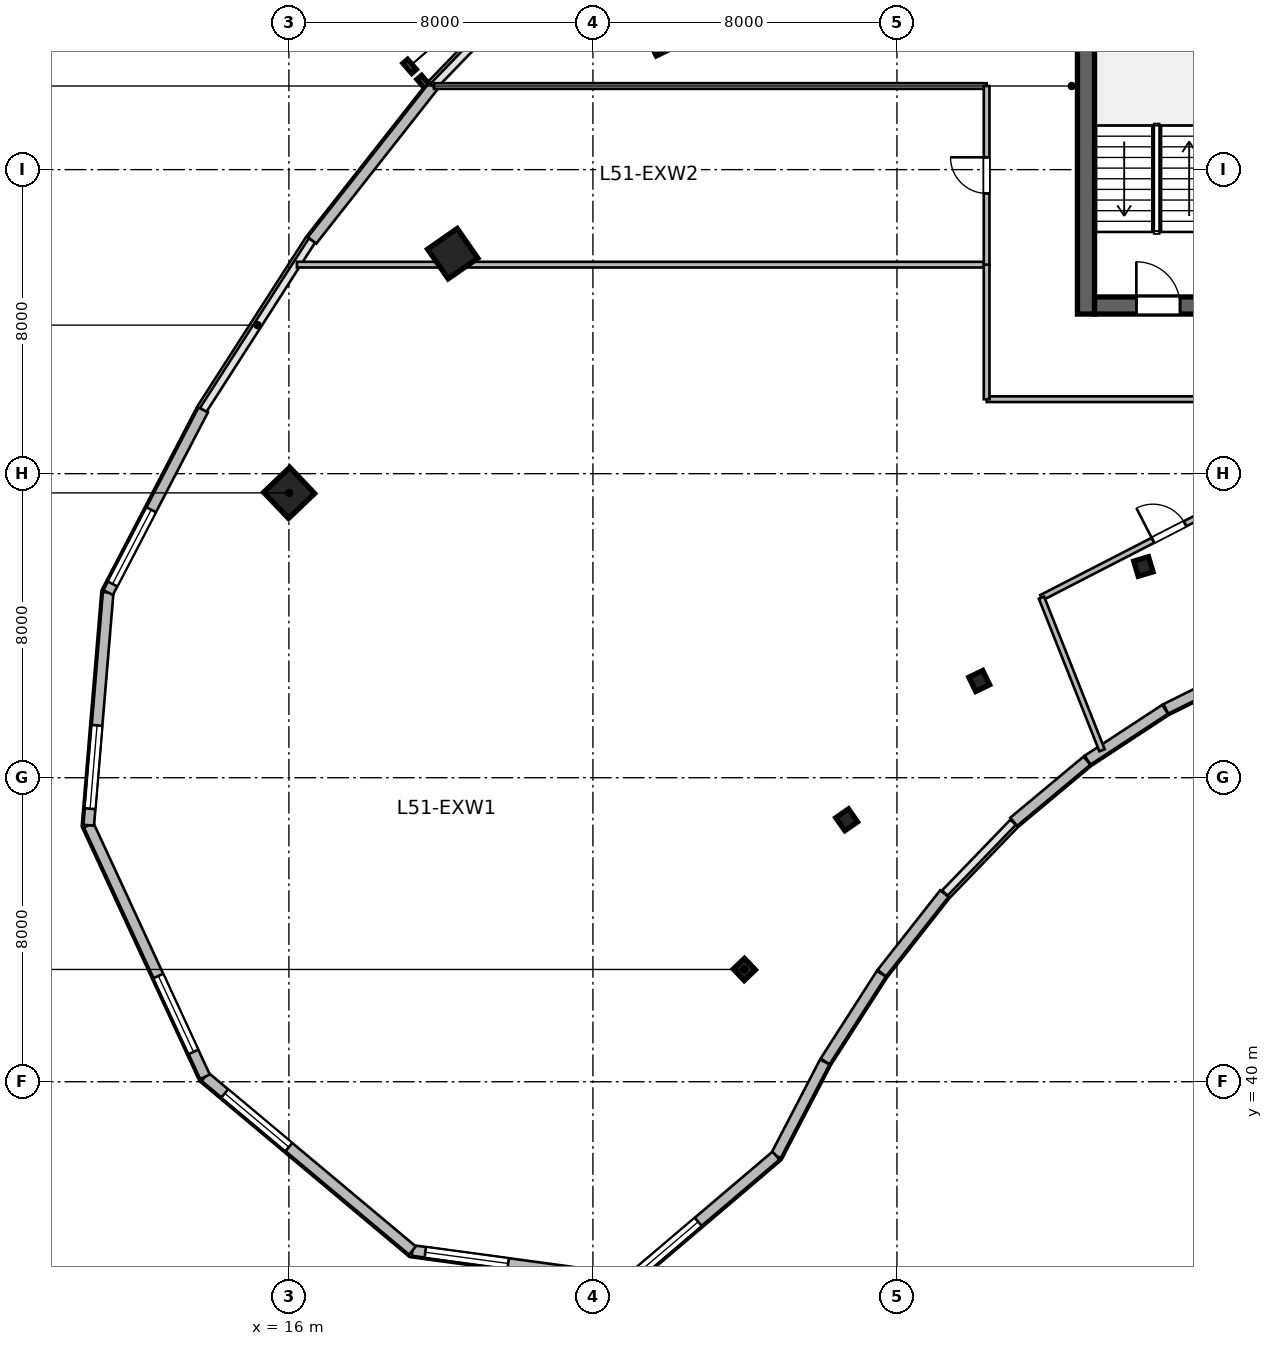
"""IFC4 building model, lengths in metres.
Left out: names, types, materials, properties, quantities, classifications, styles, units other than length and angle.
Written with IfcOpenShell. Run it as: python <this file> out.ifc"""

import sys

from ifc_helpers import new_model, si_unit, direction, frame, frame_2d, origin, origin_2d, place, context, subcontext, project, spatial, rectangle, i_section, extrude, source, transform, mapped, element, fill, save


model = new_model("IFC4")
c1 = context("Model", 3, precision=1e-05, world=origin(), true_north=direction((0.0, 1.0)))
c2 = subcontext(c1, "Body", "Model", "MODEL_VIEW")
j1 = project(units=[si_unit("LENGTHUNIT", "METRE"), si_unit("PLANEANGLEUNIT", "RADIAN")], contexts=[c1])
p1 = place(None, origin())
s1 = spatial("IfcSite", under=j1, at=p1, CompositionType="ELEMENT")
p2 = place(p1, origin())
s2 = spatial("IfcBuilding", under=s1, at=p2, CompositionType="ELEMENT")
p3 = place(p2, frame((0.0, 0.0, 211.8)))
s3 = spatial("IfcBuildingStorey", under=s2, at=p3, CompositionType="ELEMENT", Elevation=211.8)
m1 = source(origin(), c2, "Body", "SweptSolid", [
    extrude(rectangle(XDim=12.0, YDim=0.45, at=frame_2d((6.0, 0.0))), origin(), (0.0, 0.0, 1.0), 3.9),
])
p4 = place(p3, frame((36.975, 60.2, 0.0), z_axis=(0.0, 0.0, 1.0), x_axis=(0.0, 1.0, 0.0)))
e1 = element("IfcWall", 1, at=p4, inside=s3, PredefinedType="SHEAR", context=c2, shape_type="MappedRepresentation", body=[
    mapped(m1, transform((0.0, 0.0, 0.0), scale=1.0)),
])
m2 = source(origin(), c2, "Body", "SweptSolid", [
    extrude(rectangle(XDim=21.6, YDim=0.45, at=frame_2d((10.8, 0.0))), origin(), (0.0, 0.0, 1.0), 3.9),
])
p5 = place(p3, frame((37.2, 60.425, 0.0), z_axis=(0.0, 0.0, 1.0), x_axis=(1.0, 0.0, 0.0)))
e2 = element("IfcWall", 2, at=p5, inside=s3, PredefinedType="SHEAR", context=c2, shape_type="MappedRepresentation", body=[
    mapped(m2, transform((0.0, 0.0, 0.0), scale=1.0)),
])
p6 = place(p5, frame((1.1, 0.0, 0.0)))
e3 = element("IfcOpeningElement", 3, at=p6, cuts=e2, PredefinedType="OPENING", context=c2, shape_type="SweptSolid", body=[
    extrude(rectangle(XDim=1.15, YDim=2.15, at=frame_2d((0.575, 1.075))), frame((0.0, 0.235, 0.0), z_axis=(0.0, -1.0, 0.0), x_axis=(1.0, 0.0, 0.0)), (0.0, 0.0, 1.0), 0.47),
])
p7 = place(p5, frame((19.5, 0.0, 0.0)))
e4 = element("IfcOpeningElement", 4, at=p7, cuts=e2, PredefinedType="OPENING", context=c2, shape_type="SweptSolid", body=[
    extrude(rectangle(XDim=0.9, YDim=2.1, at=frame_2d((0.45, 1.05))), frame((0.0, 0.235, 0.0), z_axis=(0.0, -1.0, 0.0), x_axis=(1.0, 0.0, 0.0)), (0.0, 0.0, 1.0), 0.47),
])
p8 = place(p5, frame((12.02, 0.0, 0.0)))
e5 = element("IfcOpeningElement", 5, at=p8, cuts=e2, PredefinedType="OPENING", context=c2, shape_type="SweptSolid", body=[
    extrude(rectangle(XDim=1.6, YDim=2.15, at=frame_2d((0.8, 1.075))), frame((0.0, 0.235, 0.0), z_axis=(0.0, -1.0, 0.0), x_axis=(1.0, 0.0, 0.0)), (0.0, 0.0, 1.0), 0.47),
])
m3 = source(origin(), c2, "Body", "SweptSolid", [
    extrude(i_section(OverallWidth=0.406, OverallDepth=0.416, WebThickness=0.03, FlangeThickness=0.048, at=origin_2d()), origin(), (0.0, 0.0, 1.0), 3.9),
])
p9 = place(p3, frame((27.985, 42.955, 0.0), z_axis=(0.0, 0.0, 1.0), x_axis=(-0.690756218984, 0.723087716626, 0.0)))
e6 = element("IfcColumn", 6, at=p9, inside=s3, PredefinedType="COLUMN", context=c2, shape_type="MappedRepresentation", body=[
    mapped(m3, transform((0.0, 0.0, 0.0), scale=1.0)),
])
m4 = source(origin(), c2, "Body", "SweptSolid", [
    extrude(rectangle(XDim=0.95, YDim=0.95, at=origin_2d()), origin(), (0.0, 0.0, 1.0), 3.9),
])
p10 = place(p3, frame((16.007, 55.494, 0.0), z_axis=(0.0, 0.0, 1.0), x_axis=(-0.690756218984, 0.723087716626, 0.0)))
e7 = element("IfcColumn", 7, at=p10, inside=s3, PredefinedType="COLUMN", context=c2, shape_type="MappedRepresentation", body=[
    mapped(m4, transform((0.0, 0.0, 0.0), scale=1.0)),
])
p11 = place(p3, frame((30.677, 46.892, 0.0), z_axis=(0.0, 0.0, 1.0), x_axis=(-0.571143442153, 0.820850271661, 0.0)))
e8 = element("IfcColumn", 8, at=p11, inside=s3, PredefinedType="COLUMN", context=c2, shape_type="MappedRepresentation", body=[
    mapped(m3, transform((0.0, 0.0, 0.0), scale=1.0)),
])
p12 = place(p3, frame((20.311, 61.789, 0.0), z_axis=(0.0, 0.0, 1.0), x_axis=(-0.571143442153, 0.820850271661, 0.0)))
e9 = element("IfcColumn", 9, at=p12, inside=s3, PredefinedType="COLUMN", context=c2, shape_type="MappedRepresentation", body=[
    mapped(m4, transform((0.0, 0.0, 0.0), scale=1.0)),
])
p13 = place(p3, frame((34.166, 50.545, 0.0), z_axis=(0.0, 0.0, 1.0), x_axis=(-0.436173672171, 0.899862504889, 0.0)))
e10 = element("IfcColumn", 10, at=p13, inside=s3, PredefinedType="COLUMN", context=c2, shape_type="MappedRepresentation", body=[
    mapped(m3, transform((0.0, 0.0, 0.0), scale=1.0)),
])
p14 = place(p3, frame((25.888, 67.627, 0.0), z_axis=(0.0, 0.0, 1.0), x_axis=(-0.436173672171, 0.899862504889, 0.0)))
e11 = element("IfcColumn", 11, at=p14, inside=s3, PredefinedType="COLUMN", context=c2, shape_type="MappedRepresentation", body=[
    mapped(m4, transform((0.0, 0.0, 0.0), scale=1.0)),
])
p15 = place(p3, frame((38.485, 53.558, 0.0), z_axis=(0.0, 0.0, 1.0), x_axis=(-0.288697611798, 0.957420330337, 0.0)))
e12 = element("IfcColumn", 12, at=p15, inside=s3, PredefinedType="COLUMN", context=c2, shape_type="MappedRepresentation", body=[
    mapped(m3, transform((0.0, 0.0, 0.0), scale=1.0)),
])
m5 = source(origin(), c2, "Body", "SweptSolid", [
    extrude(rectangle(XDim=2.378, YDim=0.28, at=frame_2d((1.189, 0.0))), origin(), (0.0, 0.0, 1.0), 3.64),
])
p16 = place(p3, frame((41.207, 50.868, 0.0), z_axis=(0.0, 0.0, 1.0), x_axis=(-0.895941616831, -0.444171835252, 0.0)))
e13 = element("IfcWall", 13, at=p16, inside=s3, PredefinedType="SOLIDWALL", context=c2, shape_type="MappedRepresentation", body=[
    mapped(m5, transform((0.0, 0.0, 0.0), scale=1.0)),
])
m6 = source(origin(), c2, "Body", "SweptSolid", [
    extrude(rectangle(XDim=2.44, YDim=0.28, at=frame_2d((1.22, 0.0))), origin(), (0.0, 0.0, 1.0), 3.64),
])
p17 = place(p3, frame((39.057, 49.801, 0.0), z_axis=(0.0, 0.0, 1.0), x_axis=(-0.83598480459, -0.548752591333, 0.0)))
e14 = element("IfcWall", 14, at=p17, inside=s3, PredefinedType="SOLIDWALL", context=c2, shape_type="MappedRepresentation", body=[
    mapped(m6, transform((0.0, 0.0, 0.0), scale=1.0)),
])
m7 = source(origin(), c2, "Body", "SweptSolid", [
    extrude(rectangle(XDim=2.511, YDim=0.28, at=frame_2d((1.256, 0.0))), origin(), (0.0, 0.0, 1.0), 3.64),
])
p18 = place(p3, frame((37.001, 48.449, 0.0), z_axis=(0.0, 0.0, 1.0), x_axis=(-0.767910416122, -0.640557251782, 0.0)))
e15 = element("IfcWall", 15, at=p18, inside=s3, PredefinedType="SOLIDWALL", context=c2, shape_type="MappedRepresentation", body=[
    mapped(m7, transform((0.0, 0.0, 0.0), scale=1.0)),
])
m8 = source(origin(), c2, "Body", "SweptSolid", [
    extrude(rectangle(XDim=2.666, YDim=0.28, at=frame_2d((1.333, 0.0))), origin(), (0.0, 0.0, 1.0), 3.64),
])
p19 = place(p3, frame((33.249, 44.952, 0.0), z_axis=(0.0, 0.0, 1.0), x_axis=(-0.618161284122, -0.786051287648, 0.0)))
e16 = element("IfcWall", 16, at=p19, inside=s3, PredefinedType="SOLIDWALL", context=c2, shape_type="MappedRepresentation", body=[
    mapped(m8, transform((0.0, 0.0, 0.0), scale=1.0)),
])
m9 = source(origin(), c2, "Body", "SweptSolid", [
    extrude(rectangle(XDim=2.742, YDim=0.28, at=frame_2d((1.371, 0.0))), origin(), (0.0, 0.0, 1.0), 3.64),
])
p20 = place(p3, frame((31.591, 42.843, 0.0), z_axis=(0.0, 0.0, 1.0), x_axis=(-0.540172468355, -0.841554338371, 0.0)))
e17 = element("IfcWall", 17, at=p20, inside=s3, PredefinedType="SOLIDWALL", context=c2, shape_type="MappedRepresentation", body=[
    mapped(m9, transform((0.0, 0.0, 0.0), scale=1.0)),
])
m10 = source(origin(), c2, "Body", "SweptSolid", [
    extrude(rectangle(XDim=2.779, YDim=0.28, at=frame_2d((1.39, 0.0))), origin(), (0.0, 0.0, 1.0), 3.64),
])
p21 = place(p3, frame((30.101, 40.521, 0.0), z_axis=(0.0, 0.0, 1.0), x_axis=(-0.461770308601, -0.886999538948, 0.0)))
e18 = element("IfcWall", 18, at=p21, inside=s3, PredefinedType="SOLIDWALL", context=c2, shape_type="MappedRepresentation", body=[
    mapped(m10, transform((0.0, 0.0, 0.0), scale=1.0)),
])
m11 = source(origin(), c2, "Body", "SweptSolid", [
    extrude(rectangle(XDim=5.051, YDim=0.28, at=frame_2d((2.525, 0.0))), origin(), (0.0, 0.0, 1.0), 3.64),
])
p22 = place(p3, frame((28.818, 38.056, 0.0), z_axis=(0.0, 0.0, 1.0), x_axis=(-0.761904731537, -0.647689107568, 0.0)))
e19 = element("IfcWall", 19, at=p22, inside=s3, PredefinedType="SOLIDWALL", context=c2, shape_type="MappedRepresentation", body=[
    mapped(m11, transform((0.0, 0.0, 0.0), scale=1.0)),
])
p23 = place(p22, frame((2.688, 0.0, 0.95)))
e20 = element("IfcOpeningElement", 20, at=p23, cuts=e19, PredefinedType="OPENING", context=c2, shape_type="SweptSolid", body=[
    extrude(rectangle(XDim=2.2, YDim=2.1, at=frame_2d((1.1, 1.05))), frame((0.0, 0.15, 0.0), z_axis=(0.0, -1.0, 0.0), x_axis=(1.0, 0.0, 0.0)), (0.0, 0.0, 1.0), 0.3),
])
m12 = source(origin(), c2, "Body", "SweptSolid", [
    extrude(rectangle(XDim=5.771, YDim=0.28, at=frame_2d((2.886, 0.0))), origin(), (0.0, 0.0, 1.0), 3.64),
])
p24 = place(p3, frame((24.969, 34.784, 0.0), z_axis=(0.0, 0.0, 1.0), x_axis=(-0.990933615537, 0.134352408237, 0.0)))
e21 = element("IfcWall", 21, at=p24, inside=s3, PredefinedType="SOLIDWALL", context=c2, shape_type="MappedRepresentation", body=[
    mapped(m12, transform((0.0, 0.0, 0.0), scale=1.0)),
])
p25 = place(p24, frame((3.229, 0.0, 0.95)))
e22 = element("IfcOpeningElement", 22, at=p25, cuts=e21, PredefinedType="OPENING", context=c2, shape_type="SweptSolid", body=[
    extrude(rectangle(XDim=2.2, YDim=2.1, at=frame_2d((1.1, 1.05))), frame((0.0, 0.15, 0.0), z_axis=(0.0, -1.0, 0.0), x_axis=(1.0, 0.0, 0.0)), (0.0, 0.0, 1.0), 0.3),
])
m13 = source(origin(), c2, "Body", "SweptSolid", [
    extrude(rectangle(XDim=7.12, YDim=0.28, at=frame_2d((3.56, 0.0))), origin(), (0.0, 0.0, 1.0), 3.64),
])
p26 = place(p3, frame((19.25, 35.56, 0.0), z_axis=(0.0, 0.0, 1.0), x_axis=(-0.766709783564, 0.641993853387, 0.0)))
e23 = element("IfcWall", 23, at=p26, inside=s3, PredefinedType="SOLIDWALL", context=c2, shape_type="MappedRepresentation", body=[
    mapped(m13, transform((0.0, 0.0, 0.0), scale=1.0)),
])
p27 = place(p26, frame((4.24, 0.0, 0.95)))
e24 = element("IfcOpeningElement", 24, at=p27, cuts=e23, PredefinedType="OPENING", context=c2, shape_type="SweptSolid", body=[
    extrude(rectangle(XDim=2.2, YDim=2.1, at=frame_2d((1.1, 1.05))), frame((0.0, 0.15, 0.0), z_axis=(0.0, -1.0, 0.0), x_axis=(1.0, 0.0, 0.0)), (0.0, 0.0, 1.0), 0.3),
])
m14 = source(origin(), c2, "Body", "SweptSolid", [
    extrude(rectangle(XDim=7.292, YDim=0.28, at=frame_2d((3.646, 0.0))), origin(), (0.0, 0.0, 1.0), 3.64),
])
p28 = place(p3, frame((13.792, 40.131, 0.0), z_axis=(0.0, 0.0, 1.0), x_axis=(-0.419642001049, 0.907689699708, 0.0)))
e25 = element("IfcWall", 25, at=p28, inside=s3, PredefinedType="SOLIDWALL", context=c2, shape_type="MappedRepresentation", body=[
    mapped(m14, transform((0.0, 0.0, 0.0), scale=1.0)),
])
p29 = place(p28, frame((0.723, 0.0, 0.95)))
e26 = element("IfcOpeningElement", 26, at=p29, cuts=e25, PredefinedType="OPENING", context=c2, shape_type="SweptSolid", body=[
    extrude(rectangle(XDim=2.2, YDim=2.1, at=frame_2d((1.1, 1.05))), frame((0.0, 0.15, 0.0), z_axis=(0.0, -1.0, 0.0), x_axis=(1.0, 0.0, 0.0)), (0.0, 0.0, 1.0), 0.3),
])
m15 = source(origin(), c2, "Body", "SweptSolid", [
    extrude(rectangle(XDim=6.146, YDim=0.28, at=frame_2d((3.073, 0.0))), origin(), (0.0, 0.0, 1.0), 3.64),
])
p30 = place(p3, frame((10.732, 46.749, 0.0), z_axis=(0.0, 0.0, 1.0), x_axis=(0.083301904456, 0.996524356307, 0.0)))
e27 = element("IfcWall", 27, at=p30, inside=s3, PredefinedType="SOLIDWALL", context=c2, shape_type="MappedRepresentation", body=[
    mapped(m15, transform((0.0, 0.0, 0.0), scale=1.0)),
])
p31 = place(p30, frame((0.436, 0.0, 0.95)))
e28 = element("IfcOpeningElement", 28, at=p31, cuts=e27, PredefinedType="OPENING", context=c2, shape_type="SweptSolid", body=[
    extrude(rectangle(XDim=2.2, YDim=2.1, at=frame_2d((1.1, 1.05))), frame((0.0, 0.15, 0.0), z_axis=(0.0, -1.0, 0.0), x_axis=(1.0, 0.0, 0.0)), (0.0, 0.0, 1.0), 0.3),
])
m16 = source(origin(), c2, "Body", "SweptSolid", [
    extrude(rectangle(XDim=5.416, YDim=0.28, at=frame_2d((2.708, 0.0))), origin(), (0.0, 0.0, 1.0), 3.64),
])
p32 = place(p3, frame((11.244, 52.874, 0.0), z_axis=(0.0, 0.0, 1.0), x_axis=(0.46177852435, 0.886995261796, 0.0)))
e29 = element("IfcWall", 29, at=p32, inside=s3, PredefinedType="SOLIDWALL", context=c2, shape_type="MappedRepresentation", body=[
    mapped(m16, transform((0.0, 0.0, 0.0), scale=1.0)),
])
p33 = place(p32, frame((0.254, 0.0, 0.95)))
e30 = element("IfcOpeningElement", 30, at=p33, cuts=e29, PredefinedType="OPENING", context=c2, shape_type="SweptSolid", body=[
    extrude(rectangle(XDim=2.2, YDim=2.1, at=frame_2d((1.1, 1.05))), frame((0.0, 0.15, 0.0), z_axis=(0.0, -1.0, 0.0), x_axis=(1.0, 0.0, 0.0)), (0.0, 0.0, 1.0), 0.3),
])
m17 = source(origin(), c2, "Body", "SweptSolid", [
    extrude(rectangle(XDim=5.153, YDim=0.28, at=frame_2d((2.577, 0.0))), origin(), (0.0, 0.0, 1.0), 3.64),
])
p34 = place(p3, frame((16.609, 62.14, 0.0), z_axis=(0.0, 0.0, 1.0), x_axis=(0.618179283891, 0.786037132054, 0.0)))
e31 = element("IfcWall", 31, at=p34, inside=s3, PredefinedType="SOLIDWALL", context=c2, shape_type="MappedRepresentation", body=[
    mapped(m17, transform((0.0, 0.0, 0.0), scale=1.0)),
])
m18 = source(origin(), c2, "Body", "SweptSolid", [
    extrude(rectangle(XDim=6.648, YDim=0.15, at=frame_2d((3.324, 0.0))), origin(), (0.0, 0.0, 1.0), 3.64),
])
p35 = place(p3, frame((35.803, 52.738, 0.0), z_axis=(0.0, 0.0, 1.0), x_axis=(0.889264330224, 0.457393649925, 0.0)))
e32 = element("IfcWall", 32, at=p35, inside=s3, PredefinedType="PARTITIONING", context=c2, shape_type="MappedRepresentation", body=[
    mapped(m18, transform((0.0, 0.0, 0.0), scale=1.0)),
])
p36 = place(p35, frame((3.299, 0.0, 0.0)))
e33 = element("IfcOpeningElement", 33, at=p36, cuts=e32, PredefinedType="OPENING", context=c2, shape_type="SweptSolid", body=[
    extrude(rectangle(XDim=0.95, YDim=2.1, at=frame_2d((0.475, 1.05))), frame((0.0, 0.085, 0.0), z_axis=(0.0, -1.0, 0.0), x_axis=(1.0, 0.0, 0.0)), (0.0, 0.0, 1.0), 0.17),
])
m19 = source(origin(), c2, "Body", "SweptSolid", [
    extrude(rectangle(XDim=4.32, YDim=0.15, at=frame_2d((2.16, 0.0))), origin(), (0.0, 0.0, 1.0), 3.64),
])
p37 = place(p3, frame((37.396, 48.723, 0.0), z_axis=(0.0, 0.0, 1.0), x_axis=(-0.368846295269, 0.929490403644, 0.0)))
e34 = element("IfcWall", 34, at=p37, inside=s3, PredefinedType="PARTITIONING", context=c2, shape_type="MappedRepresentation", body=[
    mapped(m19, transform((0.0, 0.0, 0.0), scale=1.0)),
])
m20 = source(origin(), c2, "Body", "SweptSolid", [
    extrude(rectangle(XDim=12.39, YDim=0.15, at=frame_2d((6.195, 0.0))), origin(), (0.0, 0.0, 1.0), 3.64),
])
p38 = place(p3, frame((34.36, 57.96, 0.0), z_axis=(0.0, 0.0, 1.0), x_axis=(1.0, 0.0, 0.0)))
e35 = element("IfcWall", 35, at=p38, inside=s3, PredefinedType="PARTITIONING", context=c2, shape_type="MappedRepresentation", body=[
    mapped(m20, transform((0.0, 0.0, 0.0), scale=1.0)),
])
m21 = source(origin(), c2, "Body", "SweptSolid", [
    extrude(rectangle(XDim=18.15, YDim=0.15, at=frame_2d((9.075, 0.0))), origin(), (0.0, 0.0, 1.0), 3.64),
])
p39 = place(p3, frame((16.21, 61.5, 0.0), z_axis=(0.0, 0.0, 1.0), x_axis=(1.0, 0.0, 0.0)))
e36 = element("IfcWall", 36, at=p39, inside=s3, PredefinedType="PARTITIONING", context=c2, shape_type="MappedRepresentation", body=[
    mapped(m21, transform((0.0, 0.0, 0.0), scale=1.0)),
])
m22 = source(origin(), c2, "Body", "SweptSolid", [
    extrude(rectangle(XDim=3.54, YDim=0.15, at=frame_2d((1.77, 0.0))), origin(), (0.0, 0.0, 1.0), 3.64),
])
p40 = place(p3, frame((34.36, 57.96, 0.0), z_axis=(0.0, 0.0, 1.0), x_axis=(0.0, 1.0, 0.0)))
e37 = element("IfcWall", 37, at=p40, inside=s3, PredefinedType="PARTITIONING", context=c2, shape_type="MappedRepresentation", body=[
    mapped(m22, transform((0.0, 0.0, 0.0), scale=1.0)),
])
m23 = source(origin(), c2, "Body", "SweptSolid", [
    extrude(rectangle(XDim=14.542, YDim=0.15, at=frame_2d((7.271, 0.0))), origin(), (0.0, 0.0, 1.0), 3.64),
])
p41 = place(p3, frame((19.818, 66.2, 0.0), z_axis=(0.0, 0.0, 1.0), x_axis=(1.0, 0.0, 0.0)))
e38 = element("IfcWall", 38, at=p41, inside=s3, PredefinedType="PARTITIONING", context=c2, shape_type="MappedRepresentation", body=[
    mapped(m23, transform((0.0, 0.0, 0.0), scale=1.0)),
])
m24 = source(origin(), c2, "Body", "SweptSolid", [
    extrude(rectangle(XDim=4.7, YDim=0.15, at=frame_2d((2.35, 0.0))), origin(), (0.0, 0.0, 1.0), 3.64),
])
p42 = place(p3, frame((34.36, 61.5, 0.0), z_axis=(0.0, 0.0, 1.0), x_axis=(0.0, 1.0, 0.0)))
e39 = element("IfcWall", 39, at=p42, inside=s3, PredefinedType="PARTITIONING", context=c2, shape_type="MappedRepresentation", body=[
    mapped(m24, transform((0.0, 0.0, 0.0), scale=1.0)),
])
p43 = place(p42, frame((1.875, 0.0, 0.0)))
e40 = element("IfcOpeningElement", 40, at=p43, cuts=e39, PredefinedType="OPENING", context=c2, shape_type="SweptSolid", body=[
    extrude(rectangle(XDim=0.95, YDim=2.1, at=frame_2d((0.475, 1.05))), frame((0.0, 0.085, 0.0), z_axis=(0.0, -1.0, 0.0), x_axis=(1.0, 0.0, 0.0)), (0.0, 0.0, 1.0), 0.17),
])
m25 = source(origin(), c2, "Body", "SweptSolid", [
    extrude(rectangle(XDim=2.2, YDim=2.1, at=frame_2d((1.1, 1.05))), frame((0.0, 0.03, 0.0), z_axis=(0.0, -1.0, 0.0), x_axis=(1.0, 0.0, 0.0)), (0.0, 0.0, 1.0), 0.06),
])
p44 = place(p23, origin())
e41 = element("IfcWindow", 41, at=p44, inside=s3, PartitioningType="TRIPLE_PANEL_VERTICAL", PredefinedType="WINDOW", context=c2, shape_type="MappedRepresentation", body=[
    mapped(m25, transform((0.0, 0.0, 0.0), scale=1.0)),
])
fill(e20, e41)
p45 = place(p25, origin())
e42 = element("IfcWindow", 42, at=p45, inside=s3, PartitioningType="TRIPLE_PANEL_VERTICAL", PredefinedType="WINDOW", context=c2, shape_type="MappedRepresentation", body=[
    mapped(m25, transform((0.0, 0.0, 0.0), scale=1.0)),
])
fill(e22, e42)
p46 = place(p27, origin())
e43 = element("IfcWindow", 43, at=p46, inside=s3, PartitioningType="TRIPLE_PANEL_VERTICAL", PredefinedType="WINDOW", context=c2, shape_type="MappedRepresentation", body=[
    mapped(m25, transform((0.0, 0.0, 0.0), scale=1.0)),
])
fill(e24, e43)
p47 = place(p29, origin())
e44 = element("IfcWindow", 44, at=p47, inside=s3, PartitioningType="TRIPLE_PANEL_VERTICAL", PredefinedType="WINDOW", context=c2, shape_type="MappedRepresentation", body=[
    mapped(m25, transform((0.0, 0.0, 0.0), scale=1.0)),
])
fill(e26, e44)
p48 = place(p31, origin())
e45 = element("IfcWindow", 45, at=p48, inside=s3, PartitioningType="TRIPLE_PANEL_VERTICAL", PredefinedType="WINDOW", context=c2, shape_type="MappedRepresentation", body=[
    mapped(m25, transform((0.0, 0.0, 0.0), scale=1.0)),
])
fill(e28, e45)
p49 = place(p33, origin())
e46 = element("IfcWindow", 46, at=p49, inside=s3, PartitioningType="TRIPLE_PANEL_VERTICAL", PredefinedType="WINDOW", context=c2, shape_type="MappedRepresentation", body=[
    mapped(m25, transform((0.0, 0.0, 0.0), scale=1.0)),
])
fill(e30, e46)
m26 = source(origin(), c2, "Body", "SweptSolid", [
    extrude(rectangle(XDim=1.15, YDim=2.15, at=frame_2d((0.575, 1.075))), frame((0.0, 0.025, 0.0), z_axis=(0.0, -1.0, 0.0), x_axis=(1.0, 0.0, 0.0)), (0.0, 0.0, 1.0), 0.05),
])
p50 = place(p6, origin())
e47 = element("IfcDoor", 47, at=p50, inside=s3, OperationType="SINGLE_SWING_LEFT", PredefinedType="DOOR", context=c2, shape_type="MappedRepresentation", body=[
    mapped(m26, transform((0.0, 0.0, 0.0), scale=1.0)),
])
fill(e3, e47)
m27 = source(origin(), c2, "Body", "SweptSolid", [
    extrude(rectangle(XDim=0.95, YDim=2.1, at=frame_2d((0.475, 1.05))), frame((0.0, 0.025, 0.0), z_axis=(0.0, -1.0, 0.0), x_axis=(1.0, 0.0, 0.0)), (0.0, 0.0, 1.0), 0.05),
])
p51 = place(p36, origin())
e48 = element("IfcDoor", 48, at=p51, inside=s3, OperationType="SINGLE_SWING_LEFT", PredefinedType="DOOR", context=c2, shape_type="MappedRepresentation", body=[
    mapped(m27, transform((0.0, 0.0, 0.0), scale=1.0)),
])
fill(e33, e48)
p52 = place(p43, origin())
e49 = element("IfcDoor", 49, at=p52, inside=s3, OperationType="SINGLE_SWING_RIGHT", PredefinedType="DOOR", context=c2, shape_type="MappedRepresentation", body=[
    mapped(m27, transform((0.0, 0.0, 0.0), scale=1.0)),
])
fill(e40, e49)
save(model, sys.argv[1])
